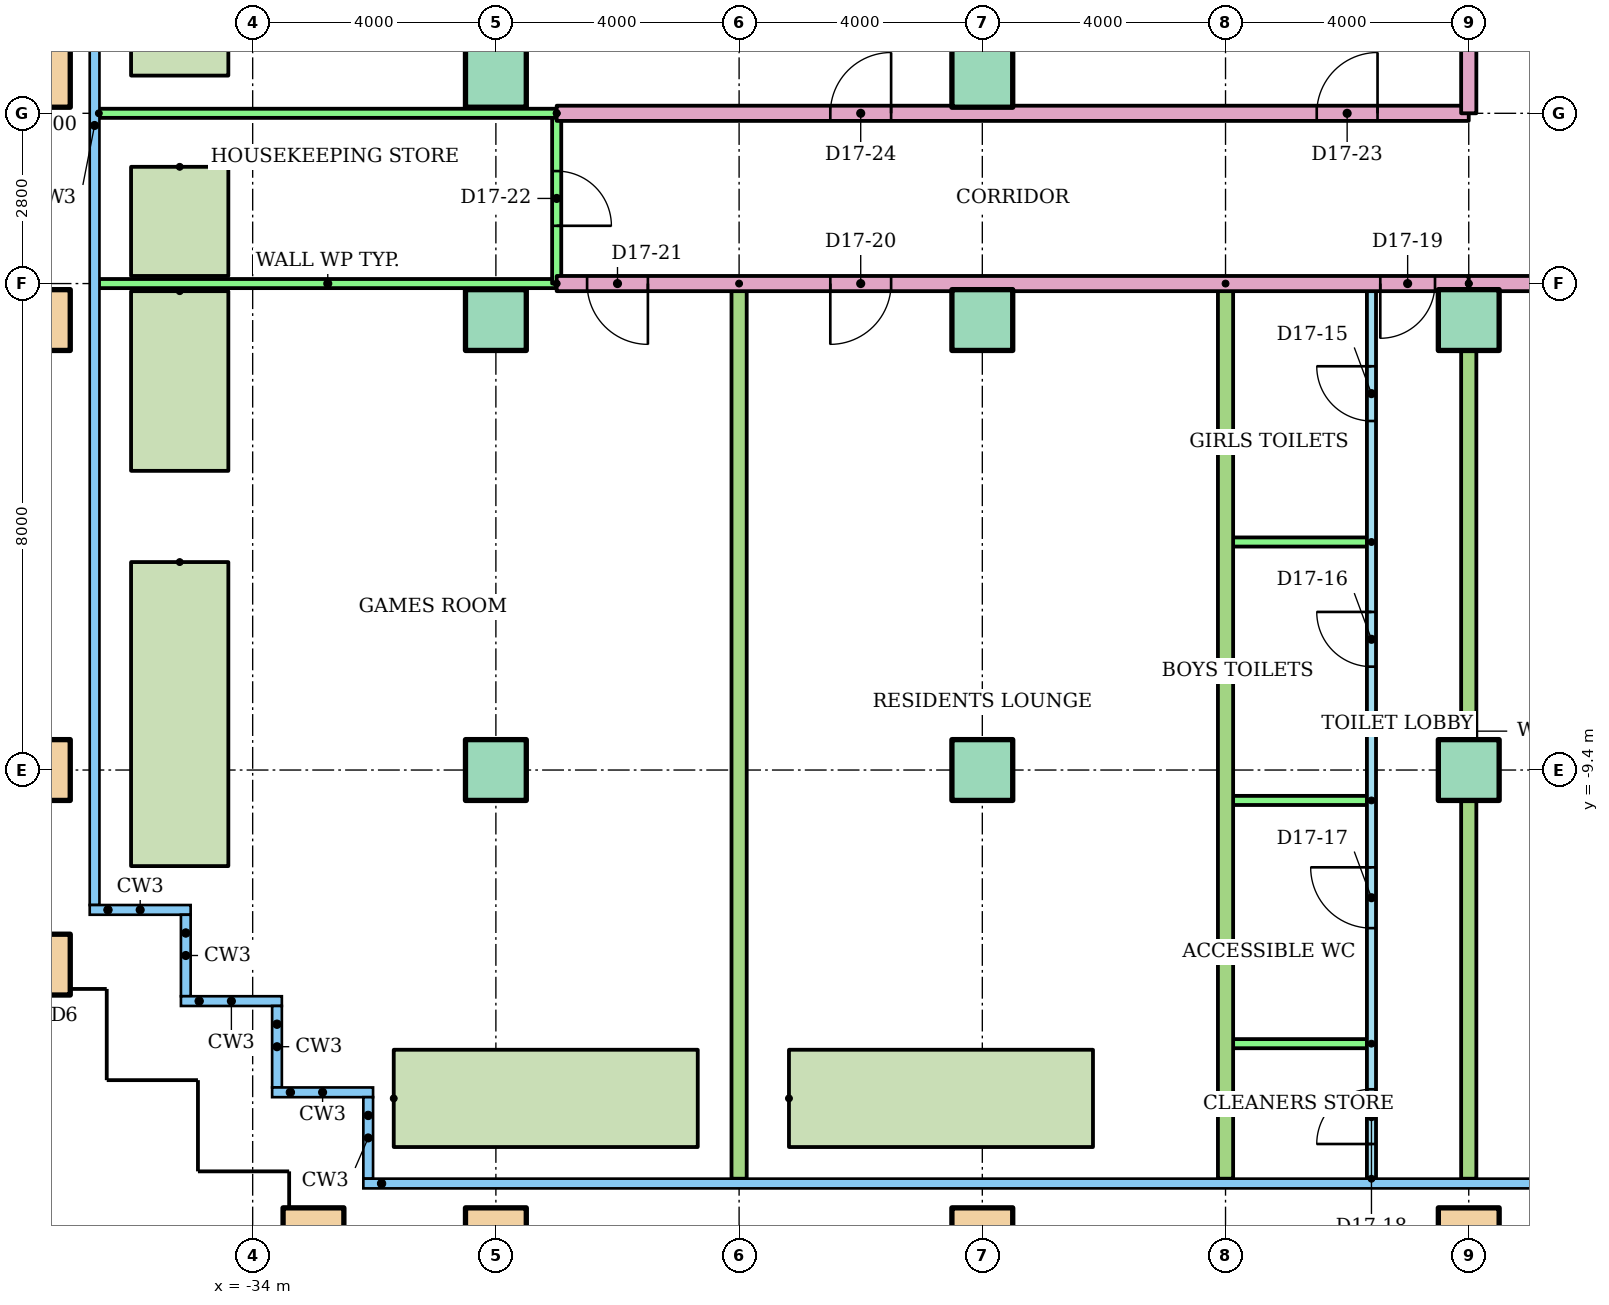
"""IFC4 building model, lengths in metres.
Left out: names, types, materials, properties, quantities, classifications, styles, units other than length and angle.
Written with IfcOpenShell. Run it as: python <this file> out.ifc"""

import sys

from ifc_helpers import new_model, si_unit, direction, frame, frame_2d, origin, origin_2d, place, context, subcontext, project, spatial, rectangle, hollow_rectangle, extrude, element, fill, save


model = new_model("IFC4")
c1 = context("Model", 3, precision=1e-05, world=origin(), true_north=direction((0.0, 1.0)))
c2 = subcontext(c1, "Body", "Model", "MODEL_VIEW")
j1 = project(units=[si_unit("LENGTHUNIT", "METRE"), si_unit("PLANEANGLEUNIT", "RADIAN")], contexts=[c1])
p1 = place(None, origin())
s1 = spatial("IfcSite", under=j1, at=p1, CompositionType="ELEMENT")
p2 = place(p1, origin())
s2 = spatial("IfcBuilding", under=s1, at=p2, CompositionType="ELEMENT")
p3 = place(p2, frame((0.0, 0.0, 64.0)))
s3 = spatial("IfcBuildingStorey", under=s2, at=p3, CompositionType="ELEMENT", Elevation=64.0)
p4 = place(p3, frame((-33.0, -17.1, 0.0)))
e1 = element("IfcColumn", 1, at=p4, inside=s3, PredefinedType="COLUMN", context=c2, shape_type="SweptSolid", body=[
    extrude(hollow_rectangle(XDim=1.0, YDim=1.0, WallThickness=0.05, at=origin_2d()), origin(), (0.0, 0.0, 1.0), 9.25),
])
p5 = place(p3, frame((-30.0, -17.1, 0.0)))
e2 = element("IfcColumn", 2, at=p5, inside=s3, PredefinedType="COLUMN", context=c2, shape_type="SweptSolid", body=[
    extrude(hollow_rectangle(XDim=1.0, YDim=1.0, WallThickness=0.05, at=origin_2d()), origin(), (0.0, 0.0, 1.0), 8.8),
])
for number, where in (
    (3, (-22.0, -17.1, 0.0)),
    (4, (-14.0, -17.1, 0.0)),
):
    element("IfcColumn", number, at=place(p3, frame(where)), inside=s3, PredefinedType="COLUMN", context=c2, shape_type="SweptSolid", body=[
        extrude(hollow_rectangle(XDim=1.0, YDim=1.0, WallThickness=0.05, at=origin_2d()), origin(), (0.0, 0.0, 1.0), 9.6),
    ])
for number, where in (
    (5, (-37.5, -12.6, 0.0)),
    (6, (-37.5, -9.4, 0.0)),
):
    element("IfcColumn", number, at=place(p3, frame(where)), inside=s3, PredefinedType="COLUMN", context=c2, shape_type="SweptSolid", body=[
        extrude(hollow_rectangle(XDim=1.0, YDim=1.0, WallThickness=0.05, at=origin_2d()), origin(), (0.0, 0.0, 1.0), 9.25),
    ])
p6 = place(p3, frame((-30.0, -9.4, 0.0)))
e7 = element("IfcColumn", 7, at=p6, inside=s3, PredefinedType="COLUMN", context=c2, shape_type="SweptSolid", body=[
    extrude(rectangle(XDim=1.0, YDim=1.0, at=origin_2d()), origin(), (0.0, 0.0, 1.0), 8.8),
])
for number, where in (
    (8, (-22.0, -9.4, 0.0)),
    (9, (-14.0, -9.4, 0.0)),
):
    element("IfcColumn", number, at=place(p3, frame(where)), inside=s3, PredefinedType="COLUMN", context=c2, shape_type="SweptSolid", body=[
        extrude(rectangle(XDim=1.0, YDim=1.0, at=origin_2d()), origin(), (0.0, 0.0, 1.0), 9.6),
    ])
p7 = place(p3, frame((-37.5, -2.0, 0.0)))
e10 = element("IfcColumn", 10, at=p7, inside=s3, PredefinedType="COLUMN", context=c2, shape_type="SweptSolid", body=[
    extrude(hollow_rectangle(XDim=1.0, YDim=1.0, WallThickness=0.05, at=origin_2d()), origin(), (0.0, 0.0, 1.0), 9.25),
])
p8 = place(p3, frame((-30.0, -2.0, 0.0)))
e11 = element("IfcColumn", 11, at=p8, inside=s3, PredefinedType="COLUMN", context=c2, shape_type="SweptSolid", body=[
    extrude(rectangle(XDim=1.0, YDim=1.0, at=origin_2d()), origin(), (0.0, 0.0, 1.0), 8.8),
])
for number, where in (
    (12, (-22.0, -2.0, 0.0)),
    (13, (-14.0, -2.0, 0.0)),
):
    element("IfcColumn", number, at=place(p3, frame(where)), inside=s3, PredefinedType="COLUMN", context=c2, shape_type="SweptSolid", body=[
        extrude(rectangle(XDim=1.0, YDim=1.0, at=origin_2d()), origin(), (0.0, 0.0, 1.0), 9.6),
    ])
p9 = place(p3, frame((-37.5, 2.0, 0.0)))
e14 = element("IfcColumn", 14, at=p9, inside=s3, PredefinedType="COLUMN", context=c2, shape_type="SweptSolid", body=[
    extrude(hollow_rectangle(XDim=1.0, YDim=1.0, WallThickness=0.05, at=origin_2d()), origin(), (0.0, 0.0, 1.0), 9.25),
])
p10 = place(p3, frame((-30.0, 2.0, 0.0)))
e15 = element("IfcColumn", 15, at=p10, inside=s3, PredefinedType="COLUMN", context=c2, shape_type="SweptSolid", body=[
    extrude(rectangle(XDim=1.0, YDim=1.0, at=origin_2d()), origin(), (0.0, 0.0, 1.0), 8.8),
])
p11 = place(p3, frame((-22.0, 2.0, 0.0)))
e16 = element("IfcColumn", 16, at=p11, inside=s3, PredefinedType="COLUMN", context=c2, shape_type="SweptSolid", body=[
    extrude(rectangle(XDim=1.0, YDim=1.0, at=origin_2d()), origin(), (0.0, 0.0, 1.0), 9.6),
])
for number, where, z_axis, x_axis in (
    (17, (-35.2, 7.02, 0.0), (0.0, 0.0, 1.0), (0.0, -1.0, 0.0)),
    (18, (-35.2, -5.98, 0.0), (0.0, 0.0, 1.0), (0.0, -1.0, 0.0)),
):
    element("IfcWall", number, at=place(p3, frame(where, z_axis=z_axis, x_axis=x_axis)), inside=s3, PredefinedType="STANDARD", context=c2, shape_type="SweptSolid", body=[
        extrude(rectangle(XDim=5.0, YDim=1.6, at=frame_2d((2.5, 0.0))), origin(), (0.0, 0.0, 1.0), 0.8),
    ])
for number, where in (
    (19, (-31.68, -14.8, 0.0)),
    (20, (-25.18, -14.8, 0.0)),
):
    element("IfcWall", number, at=place(p3, frame(where)), inside=s3, PredefinedType="STANDARD", context=c2, shape_type="SweptSolid", body=[
        extrude(rectangle(XDim=5.0, YDim=1.6, at=frame_2d((2.5, 0.0))), origin(), (0.0, 0.0, 1.0), 0.8),
    ])
p12 = place(p3, frame((-14.0, -1.4, 0.0), z_axis=(0.0, 0.0, 1.0), x_axis=(-1.0, 0.0, 0.0)))
e21 = element("IfcWall", 21, at=p12, inside=s3, PredefinedType="PARTITIONING", context=c2, shape_type="SweptSolid", body=[
    extrude(rectangle(XDim=15.0, YDim=0.25, at=frame_2d((7.5, 0.0))), origin(), (0.0, 0.0, 1.0), 8.8),
])
p13 = place(p12, frame((0.555, 0.0, 0.0)))
e22 = element("IfcOpeningElement", 22, at=p13, cuts=e21, PredefinedType="OPENING", context=c2, shape_type="SweptSolid", body=[
    extrude(rectangle(XDim=0.9, YDim=2.1, at=frame_2d((0.45, 1.05))), frame((0.0, 0.135, 0.0), z_axis=(0.0, -1.0, 0.0), x_axis=(1.0, 0.0, 0.0)), (0.0, 0.0, 1.0), 0.27),
])
p14 = place(p12, frame((9.5, 0.0, 0.0)))
e23 = element("IfcOpeningElement", 23, at=p14, cuts=e21, PredefinedType="OPENING", context=c2, shape_type="SweptSolid", body=[
    extrude(rectangle(XDim=1.0, YDim=2.1, at=frame_2d((0.5, 1.05))), frame((0.0, 0.135, 0.0), z_axis=(0.0, -1.0, 0.0), x_axis=(1.0, 0.0, 0.0)), (0.0, 0.0, 1.0), 0.27),
])
p15 = place(p12, frame((13.5, 0.0, 0.0)))
e24 = element("IfcOpeningElement", 24, at=p15, cuts=e21, PredefinedType="OPENING", context=c2, shape_type="SweptSolid", body=[
    extrude(rectangle(XDim=1.0, YDim=2.1, at=frame_2d((0.5, 1.05))), frame((0.0, 0.135, 0.0), z_axis=(0.0, -1.0, 0.0), x_axis=(1.0, 0.0, 0.0)), (0.0, 0.0, 1.0), 0.27),
])
p16 = place(p3, frame((-29.0, -1.4, 0.0), z_axis=(0.0, 0.0, 1.0), x_axis=(-1.0, 0.0, 0.0)))
e25 = element("IfcWall", 25, at=p16, inside=s3, PredefinedType="PARTITIONING", context=c2, shape_type="SweptSolid", body=[
    extrude(rectangle(XDim=7.53, YDim=0.15, at=frame_2d((3.765, 0.0))), origin(), (0.0, 0.0, 1.0), 8.8),
])
p17 = place(p3, frame((-29.0, 1.4, 0.0), z_axis=(0.0, 0.0, 1.0), x_axis=(0.0, -1.0, 0.0)))
e26 = element("IfcWall", 26, at=p17, inside=s3, PredefinedType="PARTITIONING", context=c2, shape_type="SweptSolid", body=[
    extrude(rectangle(XDim=2.8, YDim=0.15, at=frame_2d((1.4, 0.0))), origin(), (0.0, 0.0, 1.0), 8.8),
])
p18 = place(p17, frame((0.95, 0.0, 0.0)))
e27 = element("IfcOpeningElement", 27, at=p18, cuts=e26, PredefinedType="OPENING", context=c2, shape_type="SweptSolid", body=[
    extrude(rectangle(XDim=0.9, YDim=2.1, at=frame_2d((0.45, 1.05))), frame((0.0, 0.085, 0.0), z_axis=(0.0, -1.0, 0.0), x_axis=(1.0, 0.0, 0.0)), (0.0, 0.0, 1.0), 0.17),
])
p19 = place(p3, frame((-15.6, -16.121, 0.0), z_axis=(0.0, 0.0, 1.0), x_axis=(0.0, 1.0, 0.0)))
e28 = element("IfcWall", 28, at=p19, inside=s3, PredefinedType="PARTITIONING", context=c2, shape_type="SweptSolid", body=[
    extrude(rectangle(XDim=14.721, YDim=0.15, at=frame_2d((7.361, 0.0))), origin(), (0.0, 0.0, 1.0), 8.8),
])
p20 = place(p19, frame((12.461, 0.0, 0.0)))
e29 = element("IfcOpeningElement", 29, at=p20, cuts=e28, PredefinedType="OPENING", context=c2, shape_type="SweptSolid", body=[
    extrude(rectangle(XDim=0.9, YDim=2.1, at=frame_2d((0.45, 1.05))), frame((0.0, 0.085, 0.0), z_axis=(0.0, -1.0, 0.0), x_axis=(1.0, 0.0, 0.0)), (0.0, 0.0, 1.0), 0.17),
])
p21 = place(p19, frame((8.421, 0.0, 0.0)))
e30 = element("IfcOpeningElement", 30, at=p21, cuts=e28, PredefinedType="OPENING", context=c2, shape_type="SweptSolid", body=[
    extrude(rectangle(XDim=0.9, YDim=2.1, at=frame_2d((0.45, 1.05))), frame((0.0, 0.085, 0.0), z_axis=(0.0, -1.0, 0.0), x_axis=(1.0, 0.0, 0.0)), (0.0, 0.0, 1.0), 0.17),
])
p22 = place(p19, frame((4.121, 0.0, 0.0)))
e31 = element("IfcOpeningElement", 31, at=p22, cuts=e28, PredefinedType="OPENING", context=c2, shape_type="SweptSolid", body=[
    extrude(rectangle(XDim=1.0, YDim=2.1, at=frame_2d((0.5, 1.05))), frame((0.0, 0.085, 0.0), z_axis=(0.0, -1.0, 0.0), x_axis=(1.0, 0.0, 0.0)), (0.0, 0.0, 1.0), 0.17),
])
p23 = place(p19, frame((0.571, 0.0, 0.0)))
e32 = element("IfcOpeningElement", 32, at=p23, cuts=e28, PredefinedType="OPENING", context=c2, shape_type="SweptSolid", body=[
    extrude(rectangle(XDim=0.9, YDim=2.1, at=frame_2d((0.45, 1.05))), frame((0.0, 0.085, 0.0), z_axis=(0.0, -1.0, 0.0), x_axis=(1.0, 0.0, 0.0)), (0.0, 0.0, 1.0), 0.17),
])
for number, where, z_axis, x_axis in (
    (33, (-15.6, -5.65, 0.0), (0.0, 0.0, 1.0), (-1.0, 0.0, 0.0)),
    (34, (-15.6, -9.9, 0.0), (0.0, 0.0, 1.0), (-1.0, 0.0, 0.0)),
    (35, (-15.6, -13.9, 0.0), (0.0, 0.0, 1.0), (-1.0, 0.0, 0.0)),
):
    element("IfcWall", number, at=place(p3, frame(where, z_axis=z_axis, x_axis=x_axis)), inside=s3, PredefinedType="PARTITIONING", context=c2, shape_type="SweptSolid", body=[
        extrude(rectangle(XDim=2.4, YDim=0.15, at=frame_2d((1.2, 0.0))), origin(), (0.0, 0.0, 1.0), 8.8),
    ])
for number, where, z_axis, x_axis in (
    (36, (-26.0, -1.4, 0.0), (0.0, 0.0, 1.0), (0.0, -1.0, 0.0)),
    (37, (-18.0, -1.4, 0.0), (0.0, 0.0, 1.0), (0.0, -1.0, 0.0)),
    (38, (-14.0, -1.4, 0.0), (0.0, 0.0, 1.0), (0.0, -1.0, 0.0)),
):
    element("IfcWall", number, at=place(p3, frame(where, z_axis=z_axis, x_axis=x_axis)), inside=s3, PredefinedType="PARTITIONING", context=c2, shape_type="SweptSolid", body=[
        extrude(rectangle(XDim=14.721, YDim=0.25, at=frame_2d((7.361, 0.0))), origin(), (0.0, 0.0, 1.0), 8.8),
    ])
p24 = place(p3, frame((-29.0, 1.4, 0.0)))
e39 = element("IfcWall", 39, at=p24, inside=s3, PredefinedType="PARTITIONING", context=c2, shape_type="SweptSolid", body=[
    extrude(rectangle(XDim=15.0, YDim=0.25, at=frame_2d((7.5, 0.0))), origin(), (0.0, 0.0, 1.0), 8.8),
])
p25 = place(p24, frame((12.5, 0.0, 0.0)))
e40 = element("IfcOpeningElement", 40, at=p25, cuts=e39, PredefinedType="OPENING", context=c2, shape_type="SweptSolid", body=[
    extrude(rectangle(XDim=1.0, YDim=2.1, at=frame_2d((0.5, 1.05))), frame((0.0, 0.135, 0.0), z_axis=(0.0, -1.0, 0.0), x_axis=(1.0, 0.0, 0.0)), (0.0, 0.0, 1.0), 0.27),
])
p26 = place(p24, frame((4.5, 0.0, 0.0)))
e41 = element("IfcOpeningElement", 41, at=p26, cuts=e39, PredefinedType="OPENING", context=c2, shape_type="SweptSolid", body=[
    extrude(rectangle(XDim=1.0, YDim=2.1, at=frame_2d((0.5, 1.05))), frame((0.0, 0.135, 0.0), z_axis=(0.0, -1.0, 0.0), x_axis=(1.0, 0.0, 0.0)), (0.0, 0.0, 1.0), 0.27),
])
p27 = place(p3, frame((-36.53, 1.4, 0.0)))
e42 = element("IfcWall", 42, at=p27, inside=s3, PredefinedType="PARTITIONING", context=c2, shape_type="SweptSolid", body=[
    extrude(rectangle(XDim=7.53, YDim=0.15, at=frame_2d((3.765, 0.0))), origin(), (0.0, 0.0, 1.0), 8.8),
])
p28 = place(p3, frame((-22.0, 18.521, 0.0), z_axis=(0.0, 0.0, 1.0), x_axis=(0.0, -1.0, 0.0)))
e43 = element("IfcWall", 43, at=p28, inside=s3, PredefinedType="PARTITIONING", context=c2, shape_type="SweptSolid", body=[
    extrude(rectangle(XDim=17.121, YDim=0.25, at=frame_2d((8.561, 0.0))), origin(), (0.0, 0.0, 1.0), 8.8),
])
p29 = place(p3, frame((14.0, -1.4, 0.0), z_axis=(0.0, 0.0, 1.0), x_axis=(-1.0, 0.0, 0.0)))
e44 = element("IfcWall", 44, at=p29, inside=s3, PredefinedType="PARTITIONING", context=c2, shape_type="SweptSolid", body=[
    extrude(rectangle(XDim=28.0, YDim=0.25, at=frame_2d((14.0, 0.0))), origin(), (0.0, 0.0, 1.0), 8.8),
])
p30 = place(p29, frame((21.5, 0.0, 0.0)))
e45 = element("IfcOpeningElement", 45, at=p30, cuts=e44, PredefinedType="OPENING", context=c2, shape_type="SweptSolid", body=[
    extrude(rectangle(XDim=1.0, YDim=2.1, at=frame_2d((0.5, 1.05))), frame((0.0, 0.135, 0.0), z_axis=(0.0, -1.0, 0.0), x_axis=(1.0, 0.0, 0.0)), (0.0, 0.0, 1.0), 0.27),
])
p31 = place(p29, frame((17.5, 0.0, 0.0)))
e46 = element("IfcOpeningElement", 46, at=p31, cuts=e44, PredefinedType="OPENING", context=c2, shape_type="SweptSolid", body=[
    extrude(rectangle(XDim=1.0, YDim=2.1, at=frame_2d((0.5, 1.05))), frame((0.0, 0.135, 0.0), z_axis=(0.0, -1.0, 0.0), x_axis=(1.0, 0.0, 0.0)), (0.0, 0.0, 1.0), 0.27),
])
p32 = place(p29, frame((1.5, 0.0, 0.0)))
e47 = element("IfcOpeningElement", 47, at=p32, cuts=e44, PredefinedType="OPENING", context=c2, shape_type="SweptSolid", body=[
    extrude(rectangle(XDim=1.0, YDim=2.1, at=frame_2d((0.5, 1.05))), frame((0.0, 0.135, 0.0), z_axis=(0.0, -1.0, 0.0), x_axis=(1.0, 0.0, 0.0)), (0.0, 0.0, 1.0), 0.27),
])
p33 = place(p3, frame((-14.0, 3.0, 0.0), z_axis=(0.0, 0.0, 1.0), x_axis=(0.0, -1.0, 0.0)))
e48 = element("IfcWall", 48, at=p33, inside=s3, PredefinedType="PARTITIONING", context=c2, shape_type="SweptSolid", body=[
    extrude(rectangle(XDim=1.6, YDim=0.25, at=frame_2d((0.8, 0.0))), origin(), (0.0, 0.0, 1.0), 8.8),
])
p34 = place(p3, frame((-35.2, 0.52, 0.0), z_axis=(0.0, 0.0, 1.0), x_axis=(0.0, -1.0, 0.0)))
e49 = element("IfcWall", 49, at=p34, inside=s3, PredefinedType="STANDARD", context=c2, shape_type="SweptSolid", body=[
    extrude(rectangle(XDim=1.795, YDim=1.6, at=frame_2d((0.897, 0.0))), origin(), (0.0, 0.0, 1.0), 0.8),
])
p35 = place(p3, frame((-35.2, -1.525, 0.0), z_axis=(0.0, 0.0, 1.0), x_axis=(0.0, -1.0, 0.0)))
e50 = element("IfcWall", 50, at=p35, inside=s3, PredefinedType="STANDARD", context=c2, shape_type="SweptSolid", body=[
    extrude(rectangle(XDim=2.955, YDim=1.6, at=frame_2d((1.478, 0.0))), origin(), (0.0, 0.0, 1.0), 0.8),
])
p36 = place(p20, origin())
e51 = element("IfcDoor", 51, at=p36, inside=s3, OperationType="SINGLE_SWING_RIGHT", PredefinedType="DOOR", context=c2, shape_type="SweptSolid", body=[
    extrude(rectangle(XDim=0.9, YDim=2.1, at=frame_2d((0.45, 1.05))), frame((0.0, 0.025, 0.0), z_axis=(0.0, -1.0, 0.0), x_axis=(1.0, 0.0, 0.0)), (0.0, 0.0, 1.0), 0.05),
])
fill(e29, e51)
p37 = place(p21, origin())
e52 = element("IfcDoor", 52, at=p37, inside=s3, OperationType="SINGLE_SWING_RIGHT", PredefinedType="DOOR", context=c2, shape_type="SweptSolid", body=[
    extrude(rectangle(XDim=0.9, YDim=2.1, at=frame_2d((0.45, 1.05))), frame((0.0, 0.025, 0.0), z_axis=(0.0, -1.0, 0.0), x_axis=(1.0, 0.0, 0.0)), (0.0, 0.0, 1.0), 0.05),
])
fill(e30, e52)
p38 = place(p22, origin())
e53 = element("IfcDoor", 53, at=p38, inside=s3, OperationType="SINGLE_SWING_RIGHT", PredefinedType="DOOR", context=c2, shape_type="SweptSolid", body=[
    extrude(rectangle(XDim=1.0, YDim=2.1, at=frame_2d((0.5, 1.05))), frame((0.0, 0.025, 0.0), z_axis=(0.0, -1.0, 0.0), x_axis=(1.0, 0.0, 0.0)), (0.0, 0.0, 1.0), 0.05),
])
fill(e31, e53)
p39 = place(p23, origin())
e54 = element("IfcDoor", 54, at=p39, inside=s3, OperationType="SINGLE_SWING_LEFT", PredefinedType="DOOR", context=c2, shape_type="SweptSolid", body=[
    extrude(rectangle(XDim=0.9, YDim=2.1, at=frame_2d((0.45, 1.05))), frame((0.0, 0.025, 0.0), z_axis=(0.0, -1.0, 0.0), x_axis=(1.0, 0.0, 0.0)), (0.0, 0.0, 1.0), 0.05),
])
fill(e32, e54)
p40 = place(p13, origin())
e55 = element("IfcDoor", 55, at=p40, inside=s3, OperationType="SINGLE_SWING_RIGHT", PredefinedType="DOOR", context=c2, shape_type="SweptSolid", body=[
    extrude(rectangle(XDim=0.9, YDim=2.1, at=frame_2d((0.45, 1.05))), frame((0.0, 0.025, 0.0), z_axis=(0.0, -1.0, 0.0), x_axis=(1.0, 0.0, 0.0)), (0.0, 0.0, 1.0), 0.05),
])
fill(e22, e55)
p41 = place(p14, origin())
e56 = element("IfcDoor", 56, at=p41, inside=s3, OperationType="SINGLE_SWING_RIGHT", PredefinedType="DOOR", context=c2, shape_type="SweptSolid", body=[
    extrude(rectangle(XDim=1.0, YDim=2.1, at=frame_2d((0.5, 1.05))), frame((0.0, 0.025, 0.0), z_axis=(0.0, -1.0, 0.0), x_axis=(1.0, 0.0, 0.0)), (0.0, 0.0, 1.0), 0.05),
])
fill(e23, e56)
p42 = place(p15, origin())
e57 = element("IfcDoor", 57, at=p42, inside=s3, OperationType="SINGLE_SWING_LEFT", PredefinedType="DOOR", context=c2, shape_type="SweptSolid", body=[
    extrude(rectangle(XDim=1.0, YDim=2.1, at=frame_2d((0.5, 1.05))), frame((0.0, 0.025, 0.0), z_axis=(0.0, -1.0, 0.0), x_axis=(1.0, 0.0, 0.0)), (0.0, 0.0, 1.0), 0.05),
])
fill(e24, e57)
p43 = place(p18, origin())
e58 = element("IfcDoor", 58, at=p43, inside=s3, OperationType="SINGLE_SWING_RIGHT", PredefinedType="DOOR", context=c2, shape_type="SweptSolid", body=[
    extrude(rectangle(XDim=0.9, YDim=2.1, at=frame_2d((0.45, 1.05))), frame((0.0, 0.025, 0.0), z_axis=(0.0, -1.0, 0.0), x_axis=(1.0, 0.0, 0.0)), (0.0, 0.0, 1.0), 0.05),
])
fill(e27, e58)
p44 = place(p25, origin())
e59 = element("IfcDoor", 59, at=p44, inside=s3, OperationType="SINGLE_SWING_RIGHT", PredefinedType="DOOR", context=c2, shape_type="SweptSolid", body=[
    extrude(rectangle(XDim=1.0, YDim=2.1, at=frame_2d((0.5, 1.05))), frame((0.0, 0.025, 0.0), z_axis=(0.0, -1.0, 0.0), x_axis=(1.0, 0.0, 0.0)), (0.0, 0.0, 1.0), 0.05),
])
fill(e40, e59)
p45 = place(p26, origin())
e60 = element("IfcDoor", 60, at=p45, inside=s3, OperationType="SINGLE_SWING_RIGHT", PredefinedType="DOOR", context=c2, shape_type="SweptSolid", body=[
    extrude(rectangle(XDim=1.0, YDim=2.1, at=frame_2d((0.5, 1.05))), frame((0.0, 0.025, 0.0), z_axis=(0.0, -1.0, 0.0), x_axis=(1.0, 0.0, 0.0)), (0.0, 0.0, 1.0), 0.05),
])
fill(e41, e60)
save(model, sys.argv[1])
